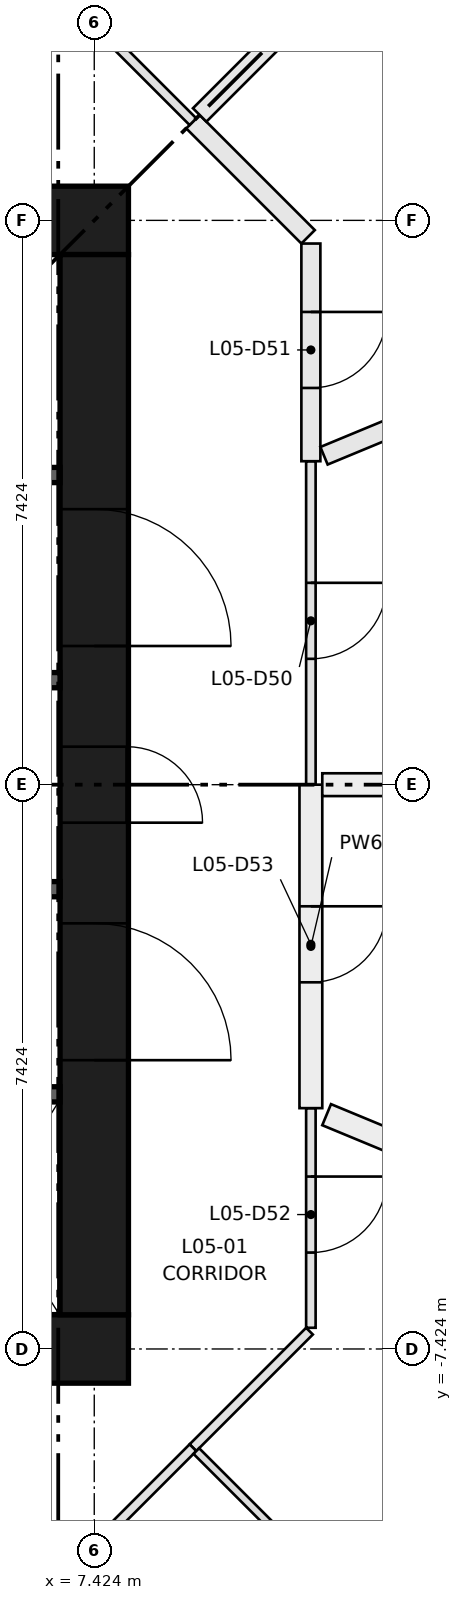
"""IFC4 building model, lengths in metres.
Left out: names, types, materials, properties, quantities, classifications, styles, units other than length and angle.
Written with IfcOpenShell. Run it as: python <this file> out.ifc"""

import sys

from ifc_helpers import new_model, si_unit, direction, frame, frame_2d, origin, place, context, subcontext, project, spatial, rectangle, extrude, element, fill, save


model = new_model("IFC4")
c1 = context("Model", 3, precision=1e-05, world=origin(), true_north=direction((0.0, 1.0)))
c2 = subcontext(c1, "Body", "Model", "MODEL_VIEW")
j1 = project(units=[si_unit("LENGTHUNIT", "METRE"), si_unit("PLANEANGLEUNIT", "RADIAN")], contexts=[c1])
p1 = place(None, origin())
s1 = spatial("IfcSite", under=j1, at=p1, CompositionType="ELEMENT")
p2 = place(p1, origin())
s2 = spatial("IfcBuilding", under=s1, at=p2, CompositionType="ELEMENT")
p3 = place(p2, frame((0.0, 0.0, 22.4)))
s3 = spatial("IfcBuildingStorey", under=s2, at=p3, CompositionType="ELEMENT", Elevation=22.4)
for number, where, z_axis, x_axis in (
    (1, (-7.874, -7.424, 0.0), (0.0, 0.0, 1.0), (1.0, 0.0, 0.0)),
    (2, (-7.874, 7.424, 0.0), (0.0, 0.0, 1.0), (1.0, 0.0, 0.0)),
):
    element("IfcWall", number, at=place(p3, frame(where, z_axis=z_axis, x_axis=x_axis)), inside=s3, PredefinedType="SHEAR", context=c2, shape_type="SweptSolid", body=[
        extrude(rectangle(XDim=15.748, YDim=0.9, at=frame_2d((7.874, 0.0))), origin(), (0.0, 0.0, 1.0), 3.8),
    ])
p4 = place(p3, frame((7.424, -6.974, 0.0), z_axis=(0.0, 0.0, 1.0), x_axis=(0.0, 1.0, 0.0)))
e3 = element("IfcWall", 3, at=p4, inside=s3, PredefinedType="SHEAR", context=c2, shape_type="SweptSolid", body=[
    extrude(rectangle(XDim=13.948, YDim=0.9, at=frame_2d((6.974, 0.0))), origin(), (0.0, 0.0, 1.0), 3.8),
])
p5 = place(p4, frame((6.474, 0.0, 0.0)))
e4 = element("IfcOpeningElement", 4, at=p5, cuts=e3, PredefinedType="OPENING", context=c2, shape_type="SweptSolid", body=[
    extrude(rectangle(XDim=1.0, YDim=2.1, at=frame_2d((0.5, 1.05))), frame((0.0, 0.46, 0.0), z_axis=(0.0, -1.0, 0.0), x_axis=(1.0, 0.0, 0.0)), (0.0, 0.0, 1.0), 0.92),
])
p6 = place(p4, frame((3.35, 0.0, 0.0)))
e5 = element("IfcOpeningElement", 5, at=p6, cuts=e3, PredefinedType="OPENING", context=c2, shape_type="SweptSolid", body=[
    extrude(rectangle(XDim=1.8, YDim=2.1, at=frame_2d((0.9, 1.05))), frame((0.0, 0.46, 0.0), z_axis=(0.0, -1.0, 0.0), x_axis=(1.0, 0.0, 0.0)), (0.0, 0.0, 1.0), 0.92),
])
p7 = place(p4, frame((8.799, 0.0, 0.0)))
e6 = element("IfcOpeningElement", 6, at=p7, cuts=e3, PredefinedType="OPENING", context=c2, shape_type="SweptSolid", body=[
    extrude(rectangle(XDim=1.8, YDim=2.1, at=frame_2d((0.9, 1.05))), frame((0.0, 0.46, 0.0), z_axis=(0.0, -1.0, 0.0), x_axis=(1.0, 0.0, 0.0)), (0.0, 0.0, 1.0), 0.92),
])
p8 = place(p3, frame((-6.974, -4.074, 0.0), z_axis=(0.0, 0.0, 1.0), x_axis=(1.0, 0.0, 0.0)))
e7 = element("IfcWall", 7, at=p8, inside=s3, PredefinedType="SHEAR", context=c2, shape_type="SweptSolid", body=[
    extrude(rectangle(XDim=13.948, YDim=0.2, at=frame_2d((6.974, 0.0))), origin(), (0.0, 0.0, 1.0), 3.45),
])
p9 = place(p8, frame((0.918, 0.0, 0.0)))
e8 = element("IfcOpeningElement", 8, at=p9, cuts=e7, PredefinedType="OPENING", context=c2, shape_type="SweptSolid", body=[
    extrude(rectangle(XDim=1.1, YDim=2.1, at=frame_2d((0.55, 1.05))), frame((0.0, 0.11, 0.0), z_axis=(0.0, -1.0, 0.0), x_axis=(1.0, 0.0, 0.0)), (0.0, 0.0, 1.0), 0.22),
])
p10 = place(p8, frame((4.055, 0.0, 0.0)))
e9 = element("IfcOpeningElement", 9, at=p10, cuts=e7, PredefinedType="OPENING", context=c2, shape_type="SweptSolid", body=[
    extrude(rectangle(XDim=1.1, YDim=2.1, at=frame_2d((0.55, 1.05))), frame((0.0, 0.11, 0.0), z_axis=(0.0, -1.0, 0.0), x_axis=(1.0, 0.0, 0.0)), (0.0, 0.0, 1.0), 0.22),
])
p11 = place(p8, frame((6.658, 0.0, 0.0)))
e10 = element("IfcOpeningElement", 10, at=p11, cuts=e7, PredefinedType="OPENING", context=c2, shape_type="SweptSolid", body=[
    extrude(rectangle(XDim=1.0, YDim=2.1, at=frame_2d((0.5, 1.05))), frame((0.0, 0.11, 0.0), z_axis=(0.0, -1.0, 0.0), x_axis=(1.0, 0.0, 0.0)), (0.0, 0.0, 1.0), 0.22),
])
p12 = place(p8, frame((8.627, 0.0, 0.0)))
e11 = element("IfcOpeningElement", 11, at=p12, cuts=e7, PredefinedType="OPENING", context=c2, shape_type="SweptSolid", body=[
    extrude(rectangle(XDim=1.0, YDim=2.1, at=frame_2d((0.5, 1.05))), frame((0.0, 0.11, 0.0), z_axis=(0.0, -1.0, 0.0), x_axis=(1.0, 0.0, 0.0)), (0.0, 0.0, 1.0), 0.22),
])
p13 = place(p8, frame((10.595, 0.0, 0.0)))
e12 = element("IfcOpeningElement", 12, at=p13, cuts=e7, PredefinedType="OPENING", context=c2, shape_type="SweptSolid", body=[
    extrude(rectangle(XDim=1.0, YDim=2.1, at=frame_2d((0.5, 1.05))), frame((0.0, 0.11, 0.0), z_axis=(0.0, -1.0, 0.0), x_axis=(1.0, 0.0, 0.0)), (0.0, 0.0, 1.0), 0.22),
])
p14 = place(p8, frame((12.564, 0.0, 0.0)))
e13 = element("IfcOpeningElement", 13, at=p14, cuts=e7, PredefinedType="OPENING", context=c2, shape_type="SweptSolid", body=[
    extrude(rectangle(XDim=1.0, YDim=2.1, at=frame_2d((0.5, 1.05))), frame((0.0, 0.11, 0.0), z_axis=(0.0, -1.0, 0.0), x_axis=(1.0, 0.0, 0.0)), (0.0, 0.0, 1.0), 0.22),
])
p15 = place(p3, frame((0.0, 4.074, 0.0), z_axis=(0.0, 0.0, 1.0), x_axis=(1.0, 0.0, 0.0)))
e14 = element("IfcWall", 14, at=p15, inside=s3, PredefinedType="SHEAR", context=c2, shape_type="SweptSolid", body=[
    extrude(rectangle(XDim=6.974, YDim=0.2, at=frame_2d((3.487, 0.0))), origin(), (0.0, 0.0, 1.0), 3.45),
])
p16 = place(p15, frame((0.753, 0.0, 0.0)))
e15 = element("IfcOpeningElement", 15, at=p16, cuts=e14, PredefinedType="OPENING", context=c2, shape_type="SweptSolid", body=[
    extrude(rectangle(XDim=1.0, YDim=2.1, at=frame_2d((0.5, 1.05))), frame((0.0, 0.11, 0.0), z_axis=(0.0, -1.0, 0.0), x_axis=(1.0, 0.0, 0.0)), (0.0, 0.0, 1.0), 0.22),
])
p17 = place(p15, frame((2.685, 0.0, 0.0)))
e16 = element("IfcOpeningElement", 16, at=p17, cuts=e14, PredefinedType="OPENING", context=c2, shape_type="SweptSolid", body=[
    extrude(rectangle(XDim=0.95, YDim=2.1, at=frame_2d((0.475, 1.05))), frame((0.0, 0.11, 0.0), z_axis=(0.0, -1.0, 0.0), x_axis=(1.0, 0.0, 0.0)), (0.0, 0.0, 1.0), 0.22),
])
p18 = place(p15, frame((4.06, 0.0, 0.0)))
e17 = element("IfcOpeningElement", 17, at=p18, cuts=e14, PredefinedType="OPENING", context=c2, shape_type="SweptSolid", body=[
    extrude(rectangle(XDim=1.0, YDim=2.1, at=frame_2d((0.5, 1.05))), frame((0.0, 0.11, 0.0), z_axis=(0.0, -1.0, 0.0), x_axis=(1.0, 0.0, 0.0)), (0.0, 0.0, 1.0), 0.22),
])
p19 = place(p15, frame((5.79, 0.0, 0.0)))
e18 = element("IfcOpeningElement", 18, at=p19, cuts=e14, PredefinedType="OPENING", context=c2, shape_type="SweptSolid", body=[
    extrude(rectangle(XDim=0.8, YDim=2.1, at=frame_2d((0.4, 1.05))), frame((0.0, 0.11, 0.0), z_axis=(0.0, -1.0, 0.0), x_axis=(1.0, 0.0, 0.0)), (0.0, 0.0, 1.0), 0.22),
])
for number, where, z_axis, x_axis in (
    (19, (4.374, -1.375, 0.0), (0.0, 0.0, 1.0), (1.0, 0.0, 0.0)),
    (20, (4.374, 1.375, 0.0), (0.0, 0.0, 1.0), (1.0, 0.0, 0.0)),
):
    element("IfcWall", number, at=place(p3, frame(where, z_axis=z_axis, x_axis=x_axis)), inside=s3, PredefinedType="SHEAR", context=c2, shape_type="SweptSolid", body=[
        extrude(rectangle(XDim=2.6, YDim=0.2, at=frame_2d((1.3, 0.0))), origin(), (0.0, 0.0, 1.0), 3.45),
    ])
p20 = place(p3, frame((10.274, 4.256, 0.0), z_axis=(0.0, 0.0, 1.0), x_axis=(0.0, -1.0, 0.0)))
e21 = element("IfcWall", 21, at=p20, inside=s3, PredefinedType="PARTITIONING", context=c2, shape_type="SweptSolid", body=[
    extrude(rectangle(XDim=4.256, YDim=0.125, at=frame_2d((2.128, 0.0))), origin(), (0.0, 0.0, 1.0), 3.45),
])
p21 = place(p20, frame((1.6, 0.0, 0.0)))
e22 = element("IfcOpeningElement", 22, at=p21, cuts=e21, PredefinedType="OPENING", context=c2, shape_type="SweptSolid", body=[
    extrude(rectangle(XDim=1.0, YDim=2.1, at=frame_2d((0.5, 1.05))), frame((0.0, 0.073, 0.0), z_axis=(0.0, -1.0, 0.0), x_axis=(1.0, 0.0, 0.0)), (0.0, 0.0, 1.0), 0.145),
])
p22 = place(p3, frame((8.722, 8.722, 0.0), z_axis=(0.0, 0.0, 1.0), x_axis=(0.707163762272, -0.707049795509, 0.0)))
e23 = element("IfcWall", 23, at=p22, inside=s3, PredefinedType="PARTITIONING", context=c2, shape_type="SweptSolid", body=[
    extrude(rectangle(XDim=2.142, YDim=0.25, at=frame_2d((1.071, 0.0))), origin(), (0.0, 0.0, 1.0), 3.45),
])
p23 = place(p3, frame((10.274, 7.119, 0.0), z_axis=(0.0, 0.0, 1.0), x_axis=(0.0, -1.0, 0.0)))
e24 = element("IfcWall", 24, at=p23, inside=s3, PredefinedType="PARTITIONING", context=c2, shape_type="SweptSolid", body=[
    extrude(rectangle(XDim=2.864, YDim=0.25, at=frame_2d((1.432, 0.0))), origin(), (0.0, 0.0, 1.0), 3.45),
])
p24 = place(p23, frame((0.9, 0.0, 0.0)))
e25 = element("IfcOpeningElement", 25, at=p24, cuts=e24, PredefinedType="OPENING", context=c2, shape_type="SweptSolid", body=[
    extrude(rectangle(XDim=1.0, YDim=2.1, at=frame_2d((0.5, 1.05))), frame((0.0, 0.135, 0.0), z_axis=(0.0, -1.0, 0.0), x_axis=(1.0, 0.0, 0.0)), (0.0, 0.0, 1.0), 0.27),
])
p25 = place(p3, frame((10.256, -7.189, 0.0), z_axis=(0.0, 0.0, 1.0), x_axis=(-0.707163081738, -0.707050476152, 0.0)))
e26 = element("IfcWall", 26, at=p25, inside=s3, PredefinedType="PARTITIONING", context=c2, shape_type="SweptSolid", body=[
    extrude(rectangle(XDim=2.168, YDim=0.125, at=frame_2d((1.084, 0.0))), origin(), (0.0, 0.0, 1.0), 3.45),
])
p26 = place(p3, frame((10.274, -4.256, 0.0), z_axis=(0.0, 0.0, 1.0), x_axis=(0.0, -1.0, 0.0)))
e27 = element("IfcWall", 27, at=p26, inside=s3, PredefinedType="PARTITIONING", context=c2, shape_type="SweptSolid", body=[
    extrude(rectangle(XDim=2.89, YDim=0.125, at=frame_2d((1.445, 0.0))), origin(), (0.0, 0.0, 1.0), 3.45),
])
p27 = place(p26, frame((0.9, 0.0, 0.0)))
e28 = element("IfcOpeningElement", 28, at=p27, cuts=e27, PredefinedType="OPENING", context=c2, shape_type="SweptSolid", body=[
    extrude(rectangle(XDim=1.0, YDim=2.1, at=frame_2d((0.5, 1.05))), frame((0.0, 0.073, 0.0), z_axis=(0.0, -1.0, 0.0), x_axis=(1.0, 0.0, 0.0)), (0.0, 0.0, 1.0), 0.145),
])
p28 = place(p3, frame((10.274, 0.0, 0.0), z_axis=(0.0, 0.0, 1.0), x_axis=(0.0, -1.0, 0.0)))
e29 = element("IfcWall", 29, at=p28, inside=s3, PredefinedType="PARTITIONING", context=c2, shape_type="SweptSolid", body=[
    extrude(rectangle(XDim=4.256, YDim=0.3, at=frame_2d((2.128, 0.0))), origin(), (0.0, 0.0, 1.0), 3.45),
])
p29 = place(p28, frame((1.6, 0.0, 0.0)))
e30 = element("IfcOpeningElement", 30, at=p29, cuts=e29, PredefinedType="OPENING", context=c2, shape_type="SweptSolid", body=[
    extrude(rectangle(XDim=1.0, YDim=2.1, at=frame_2d((0.5, 1.05))), frame((0.0, 0.16, 0.0), z_axis=(0.0, -1.0, 0.0), x_axis=(1.0, 0.0, 0.0)), (0.0, 0.0, 1.0), 0.32),
])
for number, where, z_axis, x_axis in (
    (31, (7.189, 10.256, 0.0), (0.0, 0.0, 1.0), (0.707, -0.707, 0.0)),
    (32, (8.722, -8.722, 0.0), (0.0, 0.0, 1.0), (-0.707, -0.707, 0.0)),
):
    element("IfcWall", number, at=place(p3, frame(where, z_axis=z_axis, x_axis=x_axis)), inside=s3, PredefinedType="PARTITIONING", context=c2, shape_type="SweptSolid", body=[
        extrude(rectangle(XDim=2.168, YDim=0.125, at=frame_2d((1.084, 0.0))), origin(), (0.0, 0.0, 1.0), 3.45),
    ])
p30 = place(p3, frame((10.447, 4.327, 0.0), z_axis=(0.0, 0.0, 1.0), x_axis=(0.923886109265, 0.382667554292, 0.0)))
e33 = element("IfcWall", 33, at=p30, inside=s3, PredefinedType="PARTITIONING", context=c2, shape_type="SweptSolid", body=[
    extrude(rectangle(XDim=2.823, YDim=0.25, at=frame_2d((1.411, 0.0))), origin(), (0.0, 0.0, 1.0), 3.45),
])
p31 = place(p3, frame((13.97, 0.0, 0.0), z_axis=(0.0, 0.0, 1.0), x_axis=(-1.0, 0.0, 0.0)))
e34 = element("IfcWall", 34, at=p31, inside=s3, PredefinedType="PARTITIONING", context=c2, shape_type="SweptSolid", body=[
    extrude(rectangle(XDim=3.546, YDim=0.3, at=frame_2d((1.773, 0.0))), origin(), (0.0, 0.0, 1.0), 3.45),
])
p32 = place(p3, frame((13.152, 13.152, 0.0), z_axis=(0.0, 0.0, 1.0), x_axis=(-0.707106781187, -0.707106781187, 0.0)))
e35 = element("IfcWall", 35, at=p32, inside=s3, PredefinedType="PARTITIONING", context=c2, shape_type="SweptSolid", body=[
    extrude(rectangle(XDim=6.14, YDim=0.25, at=frame_2d((3.07, 0.0))), origin(), (0.0, 0.0, 1.0), 3.45),
])
p33 = place(p3, frame((8.767, -8.767, 0.0), z_axis=(0.0, 0.0, 1.0), x_axis=(0.707106781187, -0.707106781187, 0.0)))
e36 = element("IfcWall", 36, at=p33, inside=s3, PredefinedType="PARTITIONING", context=c2, shape_type="SweptSolid", body=[
    extrude(rectangle(XDim=6.202, YDim=0.105, at=frame_2d((3.101, 0.0))), origin(), (0.0, 0.0, 1.0), 3.45),
])
p34 = place(p3, frame((10.481, -4.342, 0.0), z_axis=(0.0, 0.0, 1.0), x_axis=(0.923891828378, -0.382653746168, 0.0)))
e37 = element("IfcWall", 37, at=p34, inside=s3, PredefinedType="PARTITIONING", context=c2, shape_type="SweptSolid", body=[
    extrude(rectangle(XDim=2.785, YDim=0.3, at=frame_2d((1.393, 0.0))), origin(), (0.0, 0.0, 1.0), 3.45),
])
p35 = place(p5, frame((1.0, 0.0, 0.0), z_axis=(0.0, 0.0, 1.0), x_axis=(-1.0, 0.0, 0.0)))
e38 = element("IfcDoor", 38, at=p35, inside=s3, OperationType="SINGLE_SWING_LEFT", PredefinedType="DOOR", context=c2, shape_type="SweptSolid", body=[
    extrude(rectangle(XDim=1.0, YDim=2.1, at=frame_2d((0.5, 1.05))), frame((0.0, 0.45, 0.0), z_axis=(0.0, -1.0, 0.0), x_axis=(1.0, 0.0, 0.0)), (0.0, 0.0, 1.0), 0.05),
])
fill(e4, e38)
p36 = place(p6, frame((1.8, 0.0, 0.0), z_axis=(0.0, 0.0, 1.0), x_axis=(-1.0, 0.0, 0.0)))
e39 = element("IfcDoor", 39, at=p36, inside=s3, OperationType="DOUBLE_DOOR_SINGLE_SWING", PredefinedType="DOOR", context=c2, shape_type="SweptSolid", body=[
    extrude(rectangle(XDim=1.8, YDim=2.1, at=frame_2d((0.9, 1.05))), frame((0.0, 0.025, 0.0), z_axis=(0.0, -1.0, 0.0), x_axis=(1.0, 0.0, 0.0)), (0.0, 0.0, 1.0), 0.05),
])
fill(e5, e39)
p37 = place(p7, frame((1.8, 0.0, 0.0), z_axis=(0.0, 0.0, 1.0), x_axis=(-1.0, 0.0, 0.0)))
e40 = element("IfcDoor", 40, at=p37, inside=s3, OperationType="DOUBLE_DOOR_SINGLE_SWING", PredefinedType="DOOR", context=c2, shape_type="SweptSolid", body=[
    extrude(rectangle(XDim=1.8, YDim=2.1, at=frame_2d((0.9, 1.05))), frame((0.0, 0.025, 0.0), z_axis=(0.0, -1.0, 0.0), x_axis=(1.0, 0.0, 0.0)), (0.0, 0.0, 1.0), 0.05),
])
fill(e6, e40)
p38 = place(p21, origin())
e41 = element("IfcDoor", 41, at=p38, inside=s3, OperationType="SINGLE_SWING_LEFT", PredefinedType="DOOR", context=c2, shape_type="SweptSolid", body=[
    extrude(rectangle(XDim=1.0, YDim=2.1, at=frame_2d((0.5, 1.05))), frame((0.0, 0.025, 0.0), z_axis=(0.0, -1.0, 0.0), x_axis=(1.0, 0.0, 0.0)), (0.0, 0.0, 1.0), 0.05),
])
fill(e22, e41)
p39 = place(p24, origin())
e42 = element("IfcDoor", 42, at=p39, inside=s3, OperationType="SINGLE_SWING_LEFT", PredefinedType="DOOR", context=c2, shape_type="SweptSolid", body=[
    extrude(rectangle(XDim=1.0, YDim=2.1, at=frame_2d((0.5, 1.05))), frame((0.0, 0.025, 0.0), z_axis=(0.0, -1.0, 0.0), x_axis=(1.0, 0.0, 0.0)), (0.0, 0.0, 1.0), 0.05),
])
fill(e25, e42)
p40 = place(p27, origin())
e43 = element("IfcDoor", 43, at=p40, inside=s3, OperationType="SINGLE_SWING_LEFT", PredefinedType="DOOR", context=c2, shape_type="SweptSolid", body=[
    extrude(rectangle(XDim=1.0, YDim=2.1, at=frame_2d((0.5, 1.05))), frame((0.0, 0.025, 0.0), z_axis=(0.0, -1.0, 0.0), x_axis=(1.0, 0.0, 0.0)), (0.0, 0.0, 1.0), 0.05),
])
fill(e28, e43)
p41 = place(p29, origin())
e44 = element("IfcDoor", 44, at=p41, inside=s3, OperationType="SINGLE_SWING_LEFT", PredefinedType="DOOR", context=c2, shape_type="SweptSolid", body=[
    extrude(rectangle(XDim=1.0, YDim=2.1, at=frame_2d((0.5, 1.05))), frame((0.0, 0.025, 0.0), z_axis=(0.0, -1.0, 0.0), x_axis=(1.0, 0.0, 0.0)), (0.0, 0.0, 1.0), 0.05),
])
fill(e30, e44)
save(model, sys.argv[1])
